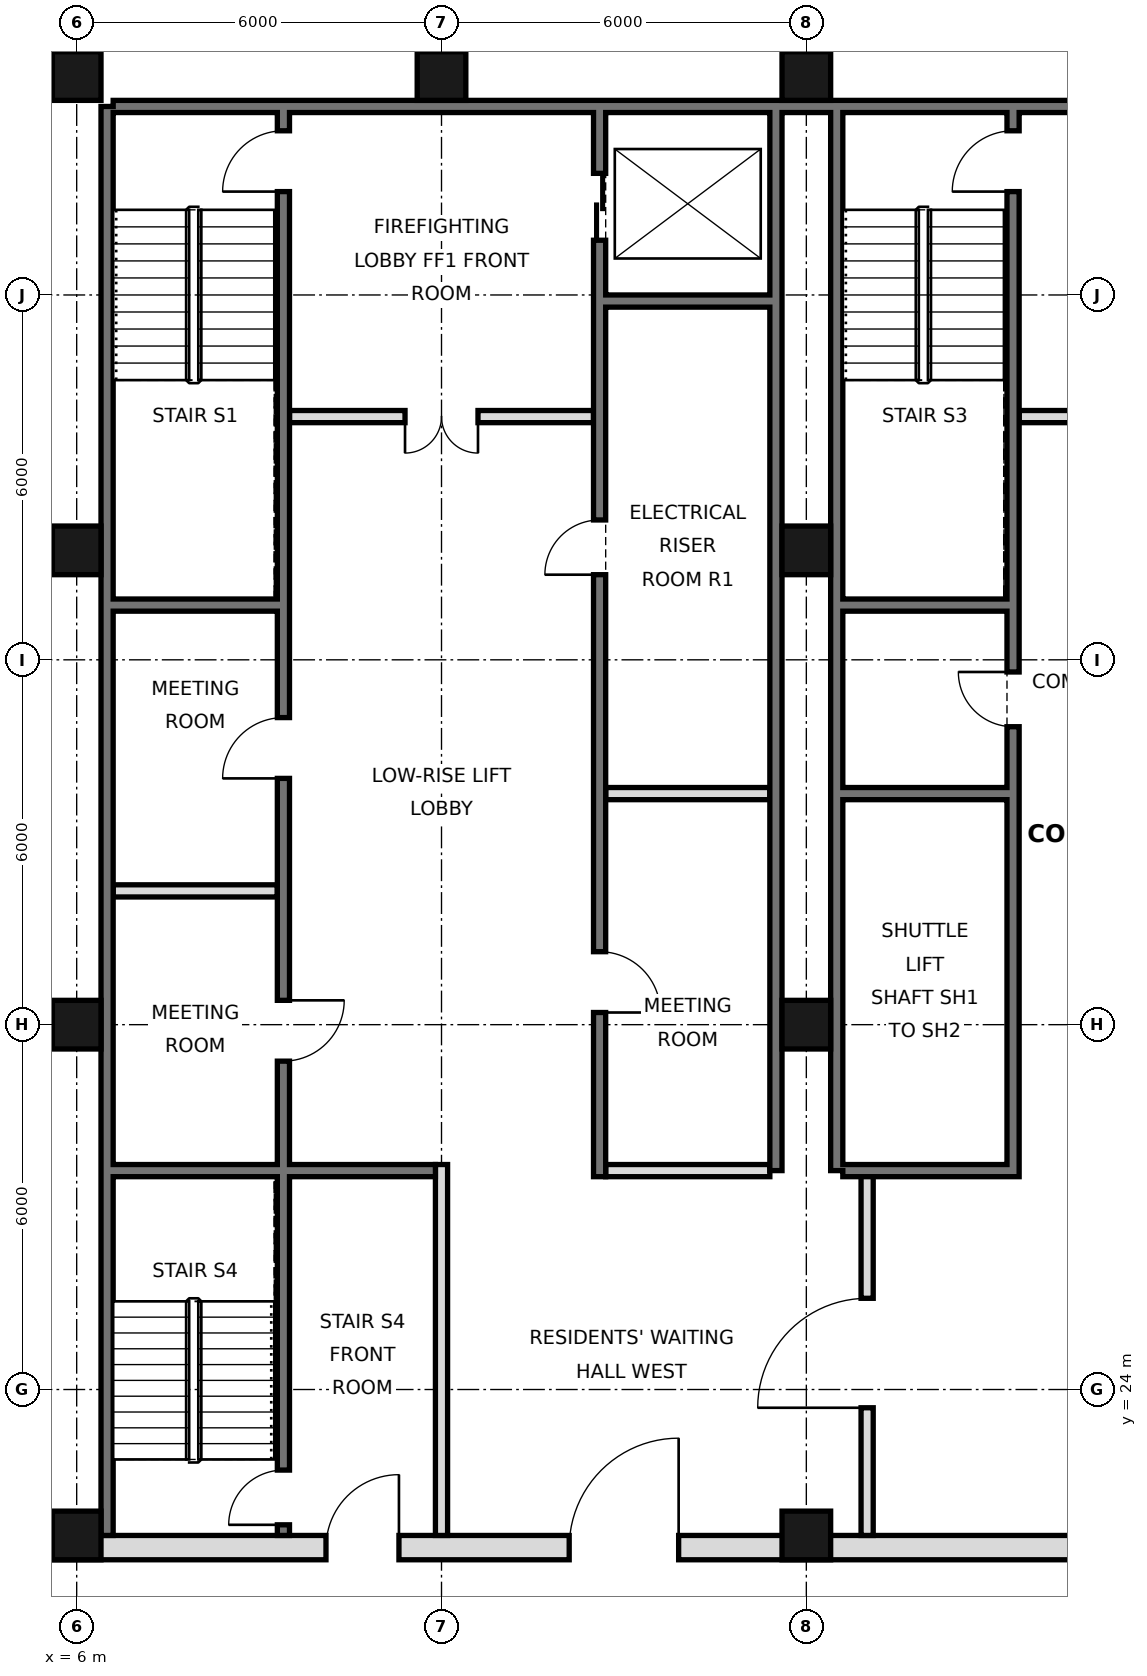
"""IFC4 building model, lengths in metres.
Left out: names, types, materials, properties, quantities, classifications, styles, units other than length and angle.
Written with IfcOpenShell. Run it as: python <this file> out.ifc"""

import sys

from ifc_helpers import new_model, si_unit, direction, frame, frame_2d, origin, origin_2d, place, context, subcontext, project, spatial, rectangle, hollow_rectangle, extrude, element, fill, save


model = new_model("IFC4")
c1 = context("Model", 3, precision=1e-05, world=origin(), true_north=direction((0.0, 1.0)))
c2 = subcontext(c1, "Body", "Model", "MODEL_VIEW")
j1 = project(units=[si_unit("LENGTHUNIT", "METRE"), si_unit("PLANEANGLEUNIT", "RADIAN")], contexts=[c1])
p1 = place(None, origin())
s1 = spatial("IfcSite", under=j1, at=p1, CompositionType="ELEMENT")
p2 = place(p1, origin())
s2 = spatial("IfcBuilding", under=s1, at=p2, CompositionType="ELEMENT")
p3 = place(p2, frame((0.0, 0.0, 199.2)))
s3 = spatial("IfcBuildingStorey", under=s2, at=p3, CompositionType="ELEMENT", Elevation=199.2)
for number, where, z_axis, x_axis in (
    (1, (6.0, 21.6, 0.0), (0.0, 0.0, 1.0), (1.0, 0.0, 0.0)),
    (2, (6.0, 30.0, 0.0), (0.0, 0.0, 1.0), (1.0, 0.0, 0.0)),
    (3, (6.0, 37.8, 0.0), (0.0, 0.0, 1.0), (1.0, 0.0, 0.0)),
    (4, (6.0, 45.6, 0.0), (0.0, 0.0, 1.0), (1.0, 0.0, 0.0)),
    (5, (12.0, 45.6, 0.0), (0.0, 0.0, 1.0), (1.0, 0.0, 0.0)),
    (6, (18.0, 21.6, 0.0), (0.0, 0.0, 1.0), (1.0, 0.0, 0.0)),
    (7, (18.0, 30.0, 0.0), (0.0, 0.0, 1.0), (1.0, 0.0, 0.0)),
    (8, (18.0, 37.8, 0.0), (0.0, 0.0, 1.0), (1.0, 0.0, 0.0)),
    (9, (18.0, 45.6, 0.0), (0.0, 0.0, 1.0), (1.0, 0.0, 0.0)),
):
    element("IfcColumn", number, at=place(p3, frame(where, z_axis=z_axis, x_axis=x_axis)), inside=s3, PredefinedType="COLUMN", context=c2, shape_type="SweptSolid", body=[
        extrude(hollow_rectangle(XDim=0.8, YDim=0.8, WallThickness=0.04, at=origin_2d()), origin(), (0.0, 0.0, 1.0), 3.6),
    ])
p4 = place(p3, frame((6.5, 21.6, 0.0), z_axis=(0.0, 0.0, 1.0), x_axis=(0.0, 1.0, 0.0)))
e10 = element("IfcWall", 10, at=p4, inside=s3, PredefinedType="SOLIDWALL", context=c2, shape_type="SweptSolid", body=[
    extrude(rectangle(XDim=23.5, YDim=0.2, at=frame_2d((11.75, 0.0))), origin(), (0.0, 0.0, 1.0), 3.42),
])
p5 = place(p3, frame((6.6, 45.1, 0.0), z_axis=(0.0, 0.0, 1.0), x_axis=(1.0, 0.0, 0.0)))
e11 = element("IfcWall", 11, at=p5, inside=s3, PredefinedType="SOLIDWALL", context=c2, shape_type="SweptSolid", body=[
    extrude(rectangle(XDim=34.8, YDim=0.2, at=frame_2d((17.4, 0.0))), origin(), (0.0, 0.0, 1.0), 3.42),
])
for number, where, z_axis, x_axis in (
    (12, (17.5, 27.6, 0.0), (0.0, 0.0, 1.0), (0.0, 1.0, 0.0)),
    (13, (18.5, 27.6, 0.0), (0.0, 0.0, 1.0), (0.0, 1.0, 0.0)),
):
    element("IfcWall", number, at=place(p3, frame(where, z_axis=z_axis, x_axis=x_axis)), inside=s3, PredefinedType="SOLIDWALL", context=c2, shape_type="SweptSolid", body=[
        extrude(rectangle(XDim=17.5, YDim=0.2, at=frame_2d((8.75, 0.0))), origin(), (0.0, 0.0, 1.0), 3.42),
    ])
p6 = place(p3, frame((5.6, 21.4, 0.0), z_axis=(0.0, 0.0, 1.0), x_axis=(1.0, 0.0, 0.0)))
e14 = element("IfcWall", 14, at=p6, inside=s3, PredefinedType="SOLIDWALL", context=c2, shape_type="SweptSolid", body=[
    extrude(rectangle(XDim=36.8, YDim=0.4, at=frame_2d((18.4, 0.0))), origin(), (0.0, 0.0, 1.0), 3.42),
])
p7 = place(p6, frame((8.5, 0.0, 0.0)))
e15 = element("IfcOpeningElement", 15, at=p7, cuts=e14, PredefinedType="OPENING", context=c2, shape_type="SweptSolid", body=[
    extrude(rectangle(XDim=1.8, YDim=2.1, at=frame_2d((0.9, 1.05))), frame((0.0, 0.21, 0.0), z_axis=(0.0, -1.0, 0.0), x_axis=(1.0, 0.0, 0.0)), (0.0, 0.0, 1.0), 0.42),
])
p8 = place(p6, frame((17.5, 0.0, 0.0)))
e16 = element("IfcOpeningElement", 16, at=p8, cuts=e14, PredefinedType="OPENING", context=c2, shape_type="SweptSolid", body=[
    extrude(rectangle(XDim=1.8, YDim=2.1, at=frame_2d((0.9, 1.05))), frame((0.0, 0.21, 0.0), z_axis=(0.0, -1.0, 0.0), x_axis=(1.0, 0.0, 0.0)), (0.0, 0.0, 1.0), 0.42),
])
p9 = place(p6, frame((26.5, 0.0, 0.0)))
e17 = element("IfcOpeningElement", 17, at=p9, cuts=e14, PredefinedType="OPENING", context=c2, shape_type="SweptSolid", body=[
    extrude(rectangle(XDim=1.8, YDim=2.1, at=frame_2d((0.9, 1.05))), frame((0.0, 0.21, 0.0), z_axis=(0.0, -1.0, 0.0), x_axis=(1.0, 0.0, 0.0)), (0.0, 0.0, 1.0), 0.42),
])
p10 = place(p6, frame((4.5, 0.0, 0.0)))
e18 = element("IfcOpeningElement", 18, at=p10, cuts=e14, PredefinedType="OPENING", context=c2, shape_type="SweptSolid", body=[
    extrude(rectangle(XDim=1.2, YDim=2.1, at=frame_2d((0.6, 1.05))), frame((0.0, 0.21, 0.0), z_axis=(0.0, -1.0, 0.0), x_axis=(1.0, 0.0, 0.0)), (0.0, 0.0, 1.0), 0.42),
])
p11 = place(p6, frame((31.1, 0.0, 0.0)))
e19 = element("IfcOpeningElement", 19, at=p11, cuts=e14, PredefinedType="OPENING", context=c2, shape_type="SweptSolid", body=[
    extrude(rectangle(XDim=1.2, YDim=2.1, at=frame_2d((0.6, 1.05))), frame((0.0, 0.21, 0.0), z_axis=(0.0, -1.0, 0.0), x_axis=(1.0, 0.0, 0.0)), (0.0, 0.0, 1.0), 0.42),
])
p12 = place(p3, frame((19.0, 21.6, 0.0), z_axis=(0.0, 0.0, 1.0), x_axis=(0.0, 1.0, 0.0)))
e20 = element("IfcWall", 20, at=p12, inside=s3, PredefinedType="PARTITIONING", context=c2, shape_type="SweptSolid", body=[
    extrude(rectangle(XDim=6.0, YDim=0.2, at=frame_2d((3.0, 0.0))), origin(), (0.0, 0.0, 1.0), 3.42),
])
p13 = place(p12, frame((2.1, 0.0, 0.0)))
e21 = element("IfcOpeningElement", 21, at=p13, cuts=e20, PredefinedType="OPENING", context=c2, shape_type="SweptSolid", body=[
    extrude(rectangle(XDim=1.8, YDim=2.1, at=frame_2d((0.9, 1.05))), frame((0.0, 0.11, 0.0), z_axis=(0.0, -1.0, 0.0), x_axis=(1.0, 0.0, 0.0)), (0.0, 0.0, 1.0), 0.22),
])
p14 = place(p3, frame((12.0, 21.6, 0.0), z_axis=(0.0, 0.0, 1.0), x_axis=(0.0, 1.0, 0.0)))
e22 = element("IfcWall", 22, at=p14, inside=s3, PredefinedType="PARTITIONING", context=c2, shape_type="SweptSolid", body=[
    extrude(rectangle(XDim=6.1, YDim=0.2, at=frame_2d((3.05, 0.0))), origin(), (0.0, 0.0, 1.0), 3.42),
])
p15 = place(p3, frame((14.6, 27.5, 0.0), z_axis=(0.0, 0.0, 1.0), x_axis=(0.0, 1.0, 0.0)))
e23 = element("IfcWall", 23, at=p15, inside=s3, PredefinedType="SOLIDWALL", context=c2, shape_type="SweptSolid", body=[
    extrude(rectangle(XDim=17.5, YDim=0.2, at=frame_2d((8.75, 0.0))), origin(), (0.0, 0.0, 1.0), 3.42),
])
p16 = place(p15, frame((15.4, 0.0, 0.0)))
e24 = element("IfcOpeningElement", 24, at=p16, cuts=e23, PredefinedType="OPENING", context=c2, shape_type="SweptSolid", body=[
    extrude(rectangle(XDim=1.1, YDim=2.1, at=frame_2d((0.55, 1.05))), frame((0.0, 0.11, 0.0), z_axis=(0.0, -1.0, 0.0), x_axis=(1.0, 0.0, 0.0)), (0.0, 0.0, 1.0), 0.22),
])
p17 = place(p15, frame((2.7, 0.0, 0.0)))
e25 = element("IfcOpeningElement", 25, at=p17, cuts=e23, PredefinedType="OPENING", context=c2, shape_type="SweptSolid", body=[
    extrude(rectangle(XDim=1.0, YDim=2.1, at=frame_2d((0.5, 1.05))), frame((0.0, 0.11, 0.0), z_axis=(0.0, -1.0, 0.0), x_axis=(1.0, 0.0, 0.0)), (0.0, 0.0, 1.0), 0.22),
])
p18 = place(p15, frame((9.9, 0.0, 0.0)))
e26 = element("IfcOpeningElement", 26, at=p18, cuts=e23, PredefinedType="OPENING", context=c2, shape_type="SweptSolid", body=[
    extrude(rectangle(XDim=0.9, YDim=2.1, at=frame_2d((0.45, 1.05))), frame((0.0, 0.11, 0.0), z_axis=(0.0, -1.0, 0.0), x_axis=(1.0, 0.0, 0.0)), (0.0, 0.0, 1.0), 0.22),
])
p19 = place(p3, frame((21.4, 27.5, 0.0), z_axis=(0.0, 0.0, 1.0), x_axis=(0.0, 1.0, 0.0)))
e27 = element("IfcWall", 27, at=p19, inside=s3, PredefinedType="SOLIDWALL", context=c2, shape_type="SweptSolid", body=[
    extrude(rectangle(XDim=17.5, YDim=0.2, at=frame_2d((8.75, 0.0))), origin(), (0.0, 0.0, 1.0), 3.42),
])
p20 = place(p19, frame((16.2, 0.0, 0.0)))
e28 = element("IfcOpeningElement", 28, at=p20, cuts=e27, PredefinedType="OPENING", context=c2, shape_type="SweptSolid", body=[
    extrude(rectangle(XDim=1.0, YDim=2.1, at=frame_2d((0.5, 1.05))), frame((0.0, 0.11, 0.0), z_axis=(0.0, -1.0, 0.0), x_axis=(1.0, 0.0, 0.0)), (0.0, 0.0, 1.0), 0.22),
])
p21 = place(p19, frame((7.4, 0.0, 0.0)))
e29 = element("IfcOpeningElement", 29, at=p21, cuts=e27, PredefinedType="OPENING", context=c2, shape_type="SweptSolid", body=[
    extrude(rectangle(XDim=0.9, YDim=2.1, at=frame_2d((0.45, 1.05))), frame((0.0, 0.11, 0.0), z_axis=(0.0, -1.0, 0.0), x_axis=(1.0, 0.0, 0.0)), (0.0, 0.0, 1.0), 0.22),
])
p22 = place(p3, frame((9.4, 21.6, 0.0), z_axis=(0.0, 0.0, 1.0), x_axis=(0.0, 1.0, 0.0)))
e30 = element("IfcWall", 30, at=p22, inside=s3, PredefinedType="SOLIDWALL", context=c2, shape_type="SweptSolid", body=[
    extrude(rectangle(XDim=23.4, YDim=0.2, at=frame_2d((11.7, 0.0))), origin(), (0.0, 0.0, 1.0), 3.42),
])
p23 = place(p22, frame((7.8, 0.0, 0.0)))
e31 = element("IfcOpeningElement", 31, at=p23, cuts=e30, PredefinedType="OPENING", context=c2, shape_type="SweptSolid", body=[
    extrude(rectangle(XDim=1.0, YDim=2.1, at=frame_2d((0.5, 1.05))), frame((0.0, 0.11, 0.0), z_axis=(0.0, -1.0, 0.0), x_axis=(1.0, 0.0, 0.0)), (0.0, 0.0, 1.0), 0.22),
])
p24 = place(p22, frame((12.45, 0.0, 0.0)))
e32 = element("IfcOpeningElement", 32, at=p24, cuts=e30, PredefinedType="OPENING", context=c2, shape_type="SweptSolid", body=[
    extrude(rectangle(XDim=1.0, YDim=2.1, at=frame_2d((0.5, 1.05))), frame((0.0, 0.11, 0.0), z_axis=(0.0, -1.0, 0.0), x_axis=(1.0, 0.0, 0.0)), (0.0, 0.0, 1.0), 0.22),
])
p25 = place(p22, frame((22.1, 0.0, 0.0)))
e33 = element("IfcOpeningElement", 33, at=p25, cuts=e30, PredefinedType="OPENING", context=c2, shape_type="SweptSolid", body=[
    extrude(rectangle(XDim=1.0, YDim=2.1, at=frame_2d((0.5, 1.05))), frame((0.0, 0.11, 0.0), z_axis=(0.0, -1.0, 0.0), x_axis=(1.0, 0.0, 0.0)), (0.0, 0.0, 1.0), 0.22),
])
p26 = place(p22, frame((0.175, 0.0, 0.0)))
e34 = element("IfcOpeningElement", 34, at=p26, cuts=e30, PredefinedType="OPENING", context=c2, shape_type="SweptSolid", body=[
    extrude(rectangle(XDim=0.9, YDim=2.1, at=frame_2d((0.45, 1.05))), frame((0.0, 0.11, 0.0), z_axis=(0.0, -1.0, 0.0), x_axis=(1.0, 0.0, 0.0)), (0.0, 0.0, 1.0), 0.22),
])
p27 = place(p3, frame((14.7, 27.6, 0.0), z_axis=(0.0, 0.0, 1.0), x_axis=(1.0, 0.0, 0.0)))
e35 = element("IfcWall", 35, at=p27, inside=s3, PredefinedType="PARTITIONING", context=c2, shape_type="SweptSolid", body=[
    extrude(rectangle(XDim=2.7, YDim=0.2, at=frame_2d((1.35, 0.0))), origin(), (0.0, 0.0, 1.0), 3.42),
])
p28 = place(p3, frame((18.6, 27.6, 0.0), z_axis=(0.0, 0.0, 1.0), x_axis=(1.0, 0.0, 0.0)))
e36 = element("IfcWall", 36, at=p28, inside=s3, PredefinedType="SOLIDWALL", context=c2, shape_type="SweptSolid", body=[
    extrude(rectangle(XDim=2.7, YDim=0.2, at=frame_2d((1.35, 0.0))), origin(), (0.0, 0.0, 1.0), 3.42),
])
p29 = place(p3, frame((6.6, 27.6, 0.0), z_axis=(0.0, 0.0, 1.0), x_axis=(1.0, 0.0, 0.0)))
e37 = element("IfcWall", 37, at=p29, inside=s3, PredefinedType="SOLIDWALL", context=c2, shape_type="SweptSolid", body=[
    extrude(rectangle(XDim=5.3, YDim=0.2, at=frame_2d((2.65, 0.0))), origin(), (0.0, 0.0, 1.0), 3.42),
])
p30 = place(p3, frame((6.6, 32.2, 0.0), z_axis=(0.0, 0.0, 1.0), x_axis=(1.0, 0.0, 0.0)))
e38 = element("IfcWall", 38, at=p30, inside=s3, PredefinedType="PARTITIONING", context=c2, shape_type="SweptSolid", body=[
    extrude(rectangle(XDim=2.7, YDim=0.2, at=frame_2d((1.35, 0.0))), origin(), (0.0, 0.0, 1.0), 3.42),
])
for number, where, z_axis, x_axis in (
    (39, (14.7, 33.8, 0.0), (0.0, 0.0, 1.0), (1.0, 0.0, 0.0)),
    (40, (18.6, 33.8, 0.0), (0.0, 0.0, 1.0), (1.0, 0.0, 0.0)),
    (41, (18.6, 36.9, 0.0), (0.0, 0.0, 1.0), (1.0, 0.0, 0.0)),
    (42, (6.6, 36.9, 0.0), (0.0, 0.0, 1.0), (1.0, 0.0, 0.0)),
):
    element("IfcWall", number, at=place(p3, frame(where, z_axis=z_axis, x_axis=x_axis)), inside=s3, PredefinedType="SOLIDWALL", context=c2, shape_type="SweptSolid", body=[
        extrude(rectangle(XDim=2.7, YDim=0.2, at=frame_2d((1.35, 0.0))), origin(), (0.0, 0.0, 1.0), 3.42),
    ])
p31 = place(p3, frame((21.5, 40.0, 0.0), z_axis=(0.0, 0.0, 1.0), x_axis=(1.0, 0.0, 0.0)))
e43 = element("IfcWall", 43, at=p31, inside=s3, PredefinedType="PARTITIONING", context=c2, shape_type="SweptSolid", body=[
    extrude(rectangle(XDim=5.0, YDim=0.2, at=frame_2d((2.5, 0.0))), origin(), (0.0, 0.0, 1.0), 3.42),
])
p32 = place(p31, frame((1.9, 0.0, 0.0)))
e44 = element("IfcOpeningElement", 44, at=p32, cuts=e43, PredefinedType="OPENING", context=c2, shape_type="SweptSolid", body=[
    extrude(rectangle(XDim=1.2, YDim=2.1, at=frame_2d((0.6, 1.05))), frame((0.0, 0.11, 0.0), z_axis=(0.0, -1.0, 0.0), x_axis=(1.0, 0.0, 0.0)), (0.0, 0.0, 1.0), 0.22),
])
p33 = place(p3, frame((9.5, 40.0, 0.0), z_axis=(0.0, 0.0, 1.0), x_axis=(1.0, 0.0, 0.0)))
e45 = element("IfcWall", 45, at=p33, inside=s3, PredefinedType="PARTITIONING", context=c2, shape_type="SweptSolid", body=[
    extrude(rectangle(XDim=5.0, YDim=0.2, at=frame_2d((2.5, 0.0))), origin(), (0.0, 0.0, 1.0), 3.42),
])
p34 = place(p33, frame((1.9, 0.0, 0.0)))
e46 = element("IfcOpeningElement", 46, at=p34, cuts=e45, PredefinedType="OPENING", context=c2, shape_type="SweptSolid", body=[
    extrude(rectangle(XDim=1.2, YDim=2.1, at=frame_2d((0.6, 1.05))), frame((0.0, 0.11, 0.0), z_axis=(0.0, -1.0, 0.0), x_axis=(1.0, 0.0, 0.0)), (0.0, 0.0, 1.0), 0.22),
])
p35 = place(p3, frame((14.7, 41.9, 0.0), z_axis=(0.0, 0.0, 1.0), x_axis=(1.0, 0.0, 0.0)))
e47 = element("IfcWall", 47, at=p35, inside=s3, PredefinedType="SOLIDWALL", context=c2, shape_type="SweptSolid", body=[
    extrude(rectangle(XDim=2.7, YDim=0.2, at=frame_2d((1.35, 0.0))), origin(), (0.0, 0.0, 1.0), 3.42),
])
p36 = place(p7, frame((1.8, 0.0, 0.0), z_axis=(0.0, 0.0, 1.0), x_axis=(-1.0, 0.0, 0.0)))
e48 = element("IfcDoor", 48, at=p36, inside=s3, OperationType="SINGLE_SWING_LEFT", PredefinedType="DOOR", context=c2, shape_type="SweptSolid", body=[
    extrude(rectangle(XDim=1.8, YDim=2.1, at=frame_2d((0.9, 1.05))), frame((0.0, 0.025, 0.0), z_axis=(0.0, -1.0, 0.0), x_axis=(1.0, 0.0, 0.0)), (0.0, 0.0, 1.0), 0.05),
])
fill(e15, e48)
p37 = place(p13, origin())
e49 = element("IfcDoor", 49, at=p37, inside=s3, OperationType="SINGLE_SWING_LEFT", PredefinedType="DOOR", context=c2, shape_type="SweptSolid", body=[
    extrude(rectangle(XDim=1.8, YDim=2.1, at=frame_2d((0.9, 1.05))), frame((0.0, 0.025, 0.0), z_axis=(0.0, -1.0, 0.0), x_axis=(1.0, 0.0, 0.0)), (0.0, 0.0, 1.0), 0.05),
])
fill(e21, e49)
p38 = place(p10, frame((1.2, 0.0, 0.0), z_axis=(0.0, 0.0, 1.0), x_axis=(-1.0, 0.0, 0.0)))
e50 = element("IfcDoor", 50, at=p38, inside=s3, OperationType="SINGLE_SWING_LEFT", PredefinedType="DOOR", context=c2, shape_type="SweptSolid", body=[
    extrude(rectangle(XDim=1.2, YDim=2.1, at=frame_2d((0.6, 1.05))), frame((0.0, 0.025, 0.0), z_axis=(0.0, -1.0, 0.0), x_axis=(1.0, 0.0, 0.0)), (0.0, 0.0, 1.0), 0.05),
])
fill(e18, e50)
p39 = place(p34, frame((1.2, 0.0, 0.0), z_axis=(0.0, 0.0, 1.0), x_axis=(-1.0, 0.0, 0.0)))
e51 = element("IfcDoor", 51, at=p39, inside=s3, OperationType="DOUBLE_DOOR_SINGLE_SWING", PredefinedType="DOOR", context=c2, shape_type="SweptSolid", body=[
    extrude(rectangle(XDim=1.2, YDim=2.1, at=frame_2d((0.6, 1.05))), frame((0.0, 0.025, 0.0), z_axis=(0.0, -1.0, 0.0), x_axis=(1.0, 0.0, 0.0)), (0.0, 0.0, 1.0), 0.05),
])
fill(e46, e51)
p40 = place(p16, origin())
e52 = element("IfcDoor", 52, at=p40, inside=s3, OperationType="DOUBLE_DOOR_SLIDING", PredefinedType="DOOR", context=c2, shape_type="SweptSolid", body=[
    extrude(rectangle(XDim=1.1, YDim=2.1, at=frame_2d((0.55, 1.05))), frame((0.0, 0.025, 0.0), z_axis=(0.0, -1.0, 0.0), x_axis=(1.0, 0.0, 0.0)), (0.0, 0.0, 1.0), 0.05),
])
fill(e24, e52)
p41 = place(p17, frame((1.0, 0.0, 0.0), z_axis=(0.0, 0.0, 1.0), x_axis=(-1.0, 0.0, 0.0)))
e53 = element("IfcDoor", 53, at=p41, inside=s3, OperationType="SINGLE_SWING_RIGHT", PredefinedType="DOOR", context=c2, shape_type="SweptSolid", body=[
    extrude(rectangle(XDim=1.0, YDim=2.1, at=frame_2d((0.5, 1.05))), frame((0.0, 0.025, 0.0), z_axis=(0.0, -1.0, 0.0), x_axis=(1.0, 0.0, 0.0)), (0.0, 0.0, 1.0), 0.05),
])
fill(e25, e53)
p42 = place(p23, origin())
e54 = element("IfcDoor", 54, at=p42, inside=s3, OperationType="SINGLE_SWING_RIGHT", PredefinedType="DOOR", context=c2, shape_type="SweptSolid", body=[
    extrude(rectangle(XDim=1.0, YDim=2.1, at=frame_2d((0.5, 1.05))), frame((0.0, 0.025, 0.0), z_axis=(0.0, -1.0, 0.0), x_axis=(1.0, 0.0, 0.0)), (0.0, 0.0, 1.0), 0.05),
])
fill(e31, e54)
p43 = place(p24, origin())
e55 = element("IfcDoor", 55, at=p43, inside=s3, OperationType="SINGLE_SWING_LEFT", PredefinedType="DOOR", context=c2, shape_type="SweptSolid", body=[
    extrude(rectangle(XDim=1.0, YDim=2.1, at=frame_2d((0.5, 1.05))), frame((0.0, 0.025, 0.0), z_axis=(0.0, -1.0, 0.0), x_axis=(1.0, 0.0, 0.0)), (0.0, 0.0, 1.0), 0.05),
])
fill(e32, e55)
p44 = place(p25, origin())
e56 = element("IfcDoor", 56, at=p44, inside=s3, OperationType="SINGLE_SWING_LEFT", PredefinedType="DOOR", context=c2, shape_type="SweptSolid", body=[
    extrude(rectangle(XDim=1.0, YDim=2.1, at=frame_2d((0.5, 1.05))), frame((0.0, 0.025, 0.0), z_axis=(0.0, -1.0, 0.0), x_axis=(1.0, 0.0, 0.0)), (0.0, 0.0, 1.0), 0.05),
])
fill(e33, e56)
p45 = place(p20, origin())
e57 = element("IfcDoor", 57, at=p45, inside=s3, OperationType="SINGLE_SWING_LEFT", PredefinedType="DOOR", context=c2, shape_type="SweptSolid", body=[
    extrude(rectangle(XDim=1.0, YDim=2.1, at=frame_2d((0.5, 1.05))), frame((0.0, 0.025, 0.0), z_axis=(0.0, -1.0, 0.0), x_axis=(1.0, 0.0, 0.0)), (0.0, 0.0, 1.0), 0.05),
])
fill(e28, e57)
p46 = place(p26, origin())
e58 = element("IfcDoor", 58, at=p46, inside=s3, OperationType="SINGLE_SWING_LEFT", PredefinedType="DOOR", context=c2, shape_type="SweptSolid", body=[
    extrude(rectangle(XDim=0.9, YDim=2.1, at=frame_2d((0.45, 1.05))), frame((0.0, 0.025, 0.0), z_axis=(0.0, -1.0, 0.0), x_axis=(1.0, 0.0, 0.0)), (0.0, 0.0, 1.0), 0.05),
])
fill(e34, e58)
p47 = place(p18, origin())
e59 = element("IfcDoor", 59, at=p47, inside=s3, OperationType="SINGLE_SWING_LEFT", PredefinedType="DOOR", context=c2, shape_type="SweptSolid", body=[
    extrude(rectangle(XDim=0.9, YDim=2.1, at=frame_2d((0.45, 1.05))), frame((0.0, 0.025, 0.0), z_axis=(0.0, -1.0, 0.0), x_axis=(1.0, 0.0, 0.0)), (0.0, 0.0, 1.0), 0.05),
])
fill(e26, e59)
p48 = place(p21, frame((0.9, 0.0, 0.0), z_axis=(0.0, 0.0, 1.0), x_axis=(-1.0, 0.0, 0.0)))
e60 = element("IfcDoor", 60, at=p48, inside=s3, OperationType="SINGLE_SWING_LEFT", PredefinedType="DOOR", context=c2, shape_type="SweptSolid", body=[
    extrude(rectangle(XDim=0.9, YDim=2.1, at=frame_2d((0.45, 1.05))), frame((0.0, 0.025, 0.0), z_axis=(0.0, -1.0, 0.0), x_axis=(1.0, 0.0, 0.0)), (0.0, 0.0, 1.0), 0.05),
])
fill(e29, e60)
save(model, sys.argv[1])
